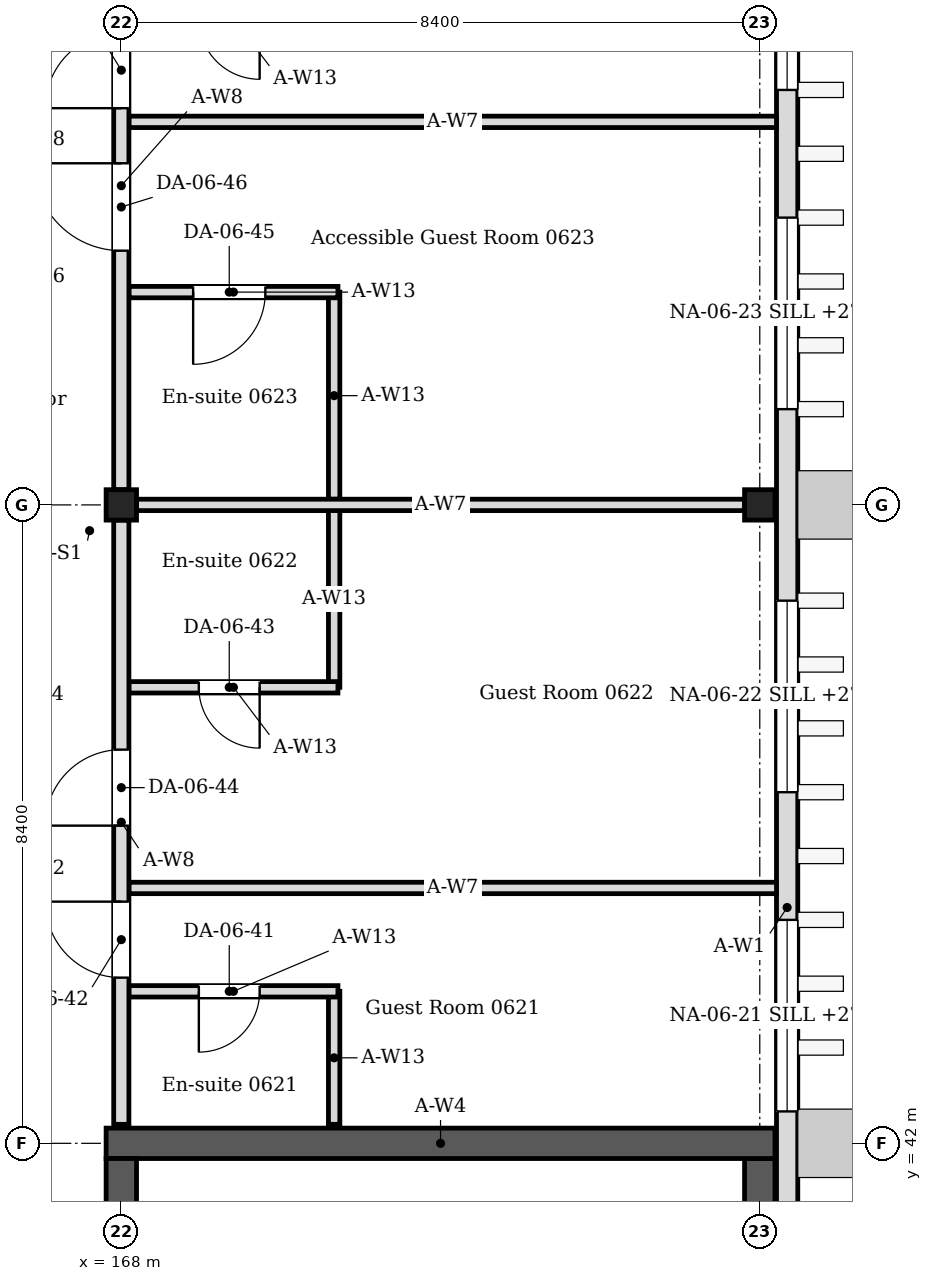
"""IFC4 building model, lengths in metres.
Left out: names, types, materials, properties, quantities, classifications, styles, units other than length and angle.
Written with IfcOpenShell. Run it as: python <this file> out.ifc"""

import sys

from ifc_helpers import new_model, si_unit, direction, frame, frame_2d, origin, origin_2d, place, context, subcontext, project, spatial, rectangle, i_section, extrude, element, fill, save


model = new_model("IFC4")
c1 = context("Model", 3, precision=1e-05, world=origin(), true_north=direction((0.0, 1.0)))
c2 = subcontext(c1, "Body", "Model", "MODEL_VIEW")
j1 = project(units=[si_unit("LENGTHUNIT", "METRE"), si_unit("PLANEANGLEUNIT", "RADIAN")], contexts=[c1])
p1 = place(None, origin())
s1 = spatial("IfcSite", under=j1, at=p1, CompositionType="ELEMENT")
p2 = place(p1, origin())
s2 = spatial("IfcBuilding", under=s1, at=p2, CompositionType="ELEMENT")
p3 = place(p2, frame((0.0, 0.0, 27.0)))
s3 = spatial("IfcBuildingStorey", under=s2, at=p3, CompositionType="ELEMENT", Elevation=27.0)
for number, where, z_axis, x_axis in (
    (1, (168.0, 50.4, 0.0), (0.0, 0.0, 1.0), (1.0, 0.0, 0.0)),
    (2, (176.4, 50.4, 0.0), (0.0, 0.0, 1.0), (1.0, 0.0, 0.0)),
):
    element("IfcColumn", number, at=place(p3, frame(where, z_axis=z_axis, x_axis=x_axis)), inside=s3, PredefinedType="COLUMN", context=c2, shape_type="SweptSolid", body=[
        extrude(i_section(OverallWidth=0.4, OverallDepth=0.4, WebThickness=0.013, FlangeThickness=0.021, FilletRadius=0.022, at=origin_2d()), origin(), (0.0, 0.0, 1.0), 4.2),
    ])
p4 = place(p3, frame((167.8, 42.0, 0.0), z_axis=(0.0, 0.0, 1.0), x_axis=(1.0, 0.0, 0.0)))
e3 = element("IfcWall", 3, at=p4, inside=s3, PredefinedType="SOLIDWALL", context=c2, shape_type="SweptSolid", body=[
    extrude(rectangle(XDim=8.8, YDim=0.4, at=frame_2d((4.4, 0.0))), origin(), (0.0, 0.0, 1.0), 4.05),
])
p5 = place(p3, frame((168.0, 25.4, 0.0), z_axis=(0.0, 0.0, 1.0), x_axis=(0.0, 1.0, 0.0)))
e4 = element("IfcWall", 4, at=p5, inside=s3, PredefinedType="SOLIDWALL", context=c2, shape_type="SweptSolid", body=[
    extrude(rectangle(XDim=16.4, YDim=0.4, at=frame_2d((8.2, 0.0))), origin(), (0.0, 0.0, 1.0), 4.05),
])
p6 = place(p5, frame((1.0, 0.0, 0.0)))
e5 = element("IfcOpeningElement", 5, at=p6, cuts=e4, PredefinedType="OPENING", context=c2, shape_type="SweptSolid", body=[
    extrude(rectangle(XDim=1.0, YDim=2.1, at=frame_2d((0.5, 1.05))), frame((0.0, 0.21, 0.0), z_axis=(0.0, -1.0, 0.0), x_axis=(1.0, 0.0, 0.0)), (0.0, 0.0, 1.0), 0.42),
])
p7 = place(p5, frame((14.4, 0.0, 0.0)))
e6 = element("IfcOpeningElement", 6, at=p7, cuts=e4, PredefinedType="OPENING", context=c2, shape_type="SweptSolid", body=[
    extrude(rectangle(XDim=1.4, YDim=2.1, at=frame_2d((0.7, 1.05))), frame((0.0, 0.21, 0.0), z_axis=(0.0, -1.0, 0.0), x_axis=(1.0, 0.0, 0.0)), (0.0, 0.0, 1.0), 0.42),
])
p8 = place(p3, frame((176.4, 25.4, 0.0), z_axis=(0.0, 0.0, 1.0), x_axis=(0.0, 1.0, 0.0)))
e7 = element("IfcWall", 7, at=p8, inside=s3, PredefinedType="SOLIDWALL", context=c2, shape_type="SweptSolid", body=[
    extrude(rectangle(XDim=16.4, YDim=0.4, at=frame_2d((8.2, 0.0))), origin(), (0.0, 0.0, 1.0), 4.05),
])
p9 = place(p3, frame((176.76, 24.85, 0.0), z_axis=(0.0, 0.0, 1.0), x_axis=(0.0, 1.0, 0.0)))
e8 = element("IfcWall", 8, at=p9, inside=s3, PredefinedType="SOLIDWALL", context=c2, shape_type="SweptSolid", body=[
    extrude(rectangle(XDim=42.57, YDim=0.28, at=frame_2d((21.285, 0.0))), origin(), (0.0, 0.0, 1.0), 4.05),
])
p10 = place(p9, frame((17.57, 0.0, 0.6)))
e9 = element("IfcOpeningElement", 9, at=p10, cuts=e8, PredefinedType="OPENING", context=c2, shape_type="SweptSolid", body=[
    extrude(rectangle(XDim=2.52, YDim=2.4, at=frame_2d((1.26, 1.2))), frame((0.0, 0.15, 0.0), z_axis=(0.0, -1.0, 0.0), x_axis=(1.0, 0.0, 0.0)), (0.0, 0.0, 1.0), 0.3),
])
p11 = place(p9, frame((21.77, 0.0, 0.6)))
e10 = element("IfcOpeningElement", 10, at=p11, cuts=e8, PredefinedType="OPENING", context=c2, shape_type="SweptSolid", body=[
    extrude(rectangle(XDim=2.52, YDim=2.4, at=frame_2d((1.26, 1.2))), frame((0.0, 0.15, 0.0), z_axis=(0.0, -1.0, 0.0), x_axis=(1.0, 0.0, 0.0)), (0.0, 0.0, 1.0), 0.3),
])
p12 = place(p9, frame((26.81, 0.0, 0.45)))
e11 = element("IfcOpeningElement", 11, at=p12, cuts=e8, PredefinedType="OPENING", context=c2, shape_type="SweptSolid", body=[
    extrude(rectangle(XDim=2.52, YDim=2.1, at=frame_2d((1.26, 1.05))), frame((0.0, 0.15, 0.0), z_axis=(0.0, -1.0, 0.0), x_axis=(1.0, 0.0, 0.0)), (0.0, 0.0, 1.0), 0.3),
])
p13 = place(p9, frame((31.01, 0.0, 0.6)))
e12 = element("IfcOpeningElement", 12, at=p13, cuts=e8, PredefinedType="OPENING", context=c2, shape_type="SweptSolid", body=[
    extrude(rectangle(XDim=2.52, YDim=2.4, at=frame_2d((1.26, 1.2))), frame((0.0, 0.15, 0.0), z_axis=(0.0, -1.0, 0.0), x_axis=(1.0, 0.0, 0.0)), (0.0, 0.0, 1.0), 0.3),
])
p14 = place(p3, frame((170.8, 42.25, 0.0), z_axis=(0.0, 0.0, 1.0), x_axis=(0.0, 1.0, 0.0)))
e13 = element("IfcWall", 13, at=p14, inside=s3, PredefinedType="PARTITIONING", context=c2, shape_type="SweptSolid", body=[
    extrude(rectangle(XDim=1.75, YDim=0.15, at=frame_2d((0.875, 0.0))), origin(), (0.0, 0.0, 1.0), 4.05),
])
p15 = place(p3, frame((170.85, 44.0, 0.0), z_axis=(0.0, 0.0, 1.0), x_axis=(-1.0, 0.0, 0.0)))
e14 = element("IfcWall", 14, at=p15, inside=s3, PredefinedType="PARTITIONING", context=c2, shape_type="SweptSolid", body=[
    extrude(rectangle(XDim=2.75, YDim=0.15, at=frame_2d((1.375, 0.0))), origin(), (0.0, 0.0, 1.0), 4.05),
])
p16 = place(p15, frame((1.03, 0.0, 0.0)))
e15 = element("IfcOpeningElement", 15, at=p16, cuts=e14, PredefinedType="OPENING", context=c2, shape_type="SweptSolid", body=[
    extrude(rectangle(XDim=0.8, YDim=2.1, at=frame_2d((0.4, 1.05))), frame((0.0, 0.085, 0.0), z_axis=(0.0, -1.0, 0.0), x_axis=(1.0, 0.0, 0.0)), (0.0, 0.0, 1.0), 0.17),
])
p17 = place(p3, frame((170.8, 48.0, 0.0), z_axis=(0.0, 0.0, 1.0), x_axis=(0.0, 1.0, 0.0)))
e16 = element("IfcWall", 16, at=p17, inside=s3, PredefinedType="PARTITIONING", context=c2, shape_type="SweptSolid", body=[
    extrude(rectangle(XDim=2.325, YDim=0.15, at=frame_2d((1.163, 0.0))), origin(), (0.0, 0.0, 1.0), 4.05),
])
p18 = place(p3, frame((170.85, 48.0, 0.0), z_axis=(0.0, 0.0, 1.0), x_axis=(-1.0, 0.0, 0.0)))
e17 = element("IfcWall", 17, at=p18, inside=s3, PredefinedType="PARTITIONING", context=c2, shape_type="SweptSolid", body=[
    extrude(rectangle(XDim=2.75, YDim=0.15, at=frame_2d((1.375, 0.0))), origin(), (0.0, 0.0, 1.0), 4.05),
])
p19 = place(p18, frame((1.03, 0.0, 0.0)))
e18 = element("IfcOpeningElement", 18, at=p19, cuts=e17, PredefinedType="OPENING", context=c2, shape_type="SweptSolid", body=[
    extrude(rectangle(XDim=0.8, YDim=2.1, at=frame_2d((0.4, 1.05))), frame((0.0, 0.085, 0.0), z_axis=(0.0, -1.0, 0.0), x_axis=(1.0, 0.0, 0.0)), (0.0, 0.0, 1.0), 0.17),
])
p20 = place(p3, frame((170.8, 50.475, 0.0), z_axis=(0.0, 0.0, 1.0), x_axis=(0.0, 1.0, 0.0)))
e19 = element("IfcWall", 19, at=p20, inside=s3, PredefinedType="PARTITIONING", context=c2, shape_type="SweptSolid", body=[
    extrude(rectangle(XDim=2.725, YDim=0.15, at=frame_2d((1.362, 0.0))), origin(), (0.0, 0.0, 1.0), 4.05),
])
p21 = place(p3, frame((170.85, 53.2, 0.0), z_axis=(0.0, 0.0, 1.0), x_axis=(-1.0, 0.0, 0.0)))
e20 = element("IfcWall", 20, at=p21, inside=s3, PredefinedType="PARTITIONING", context=c2, shape_type="SweptSolid", body=[
    extrude(rectangle(XDim=2.75, YDim=0.15, at=frame_2d((1.375, 0.0))), origin(), (0.0, 0.0, 1.0), 4.05),
])
p22 = place(p21, frame((0.955, 0.0, 0.0)))
e21 = element("IfcOpeningElement", 21, at=p22, cuts=e20, PredefinedType="OPENING", context=c2, shape_type="SweptSolid", body=[
    extrude(rectangle(XDim=0.95, YDim=2.1, at=frame_2d((0.475, 1.05))), frame((0.0, 0.085, 0.0), z_axis=(0.0, -1.0, 0.0), x_axis=(1.0, 0.0, 0.0)), (0.0, 0.0, 1.0), 0.17),
])
p23 = place(p3, frame((168.2, 50.4, 0.0), z_axis=(0.0, 0.0, 1.0), x_axis=(1.0, 0.0, 0.0)))
e22 = element("IfcWall", 22, at=p23, inside=s3, PredefinedType="PARTITIONING", context=c2, shape_type="SweptSolid", body=[
    extrude(rectangle(XDim=8.0, YDim=0.15, at=frame_2d((4.0, 0.0))), origin(), (0.0, 0.0, 1.0), 3.604),
])
for number, where, z_axis, x_axis in (
    (23, (168.1, 45.36, 0.0), (0.0, 0.0, 1.0), (1.0, 0.0, 0.0)),
    (24, (168.1, 55.44, 0.0), (0.0, 0.0, 1.0), (1.0, 0.0, 0.0)),
):
    element("IfcWall", number, at=place(p3, frame(where, z_axis=z_axis, x_axis=x_axis)), inside=s3, PredefinedType="PARTITIONING", context=c2, shape_type="SweptSolid", body=[
        extrude(rectangle(XDim=8.52, YDim=0.15, at=frame_2d((4.26, 0.0))), origin(), (0.0, 0.0, 1.0), 3.604),
    ])
p24 = place(p3, frame((168.0, 42.25, 0.0), z_axis=(0.0, 0.0, 1.0), x_axis=(0.0, 1.0, 0.0)))
e25 = element("IfcWall", 25, at=p24, inside=s3, PredefinedType="PARTITIONING", context=c2, shape_type="SweptSolid", body=[
    extrude(rectangle(XDim=7.95, YDim=0.2, at=frame_2d((3.975, 0.0))), origin(), (0.0, 0.0, 1.0), 3.45),
])
p25 = place(p24, frame((1.93, 0.0, 0.0)))
e26 = element("IfcOpeningElement", 26, at=p25, cuts=e25, PredefinedType="OPENING", context=c2, shape_type="SweptSolid", body=[
    extrude(rectangle(XDim=1.0, YDim=2.4, at=frame_2d((0.5, 1.2))), frame((0.0, 0.11, 0.0), z_axis=(0.0, -1.0, 0.0), x_axis=(1.0, 0.0, 0.0)), (0.0, 0.0, 1.0), 0.22),
])
p26 = place(p24, frame((3.93, 0.0, 0.0)))
e27 = element("IfcOpeningElement", 27, at=p26, cuts=e25, PredefinedType="OPENING", context=c2, shape_type="SweptSolid", body=[
    extrude(rectangle(XDim=1.0, YDim=2.4, at=frame_2d((0.5, 1.2))), frame((0.0, 0.11, 0.0), z_axis=(0.0, -1.0, 0.0), x_axis=(1.0, 0.0, 0.0)), (0.0, 0.0, 1.0), 0.22),
])
p27 = place(p3, frame((168.0, 50.6, 0.0), z_axis=(0.0, 0.0, 1.0), x_axis=(0.0, 1.0, 0.0)))
e28 = element("IfcWall", 28, at=p27, inside=s3, PredefinedType="PARTITIONING", context=c2, shape_type="SweptSolid", body=[
    extrude(rectangle(XDim=8.0, YDim=0.2, at=frame_2d((4.0, 0.0))), origin(), (0.0, 0.0, 1.0), 3.45),
])
p28 = place(p27, frame((3.145, 0.0, 0.0)))
e29 = element("IfcOpeningElement", 29, at=p28, cuts=e28, PredefinedType="OPENING", context=c2, shape_type="SweptSolid", body=[
    extrude(rectangle(XDim=1.15, YDim=2.1, at=frame_2d((0.575, 1.05))), frame((0.0, 0.11, 0.0), z_axis=(0.0, -1.0, 0.0), x_axis=(1.0, 0.0, 0.0)), (0.0, 0.0, 1.0), 0.22),
])
p29 = place(p27, frame((5.02, 0.0, 0.0)))
e30 = element("IfcOpeningElement", 30, at=p29, cuts=e28, PredefinedType="OPENING", context=c2, shape_type="SweptSolid", body=[
    extrude(rectangle(XDim=1.0, YDim=2.4, at=frame_2d((0.5, 1.2))), frame((0.0, 0.11, 0.0), z_axis=(0.0, -1.0, 0.0), x_axis=(1.0, 0.0, 0.0)), (0.0, 0.0, 1.0), 0.22),
])
p30 = place(p10, origin())
e31 = element("IfcWindow", 31, at=p30, inside=s3, PartitioningType="SINGLE_PANEL", PredefinedType="WINDOW", context=c2, shape_type="SweptSolid", body=[
    extrude(rectangle(XDim=2.52, YDim=2.4, at=frame_2d((1.26, 1.2))), frame((0.0, 0.03, 0.0), z_axis=(0.0, -1.0, 0.0), x_axis=(1.0, 0.0, 0.0)), (0.0, 0.0, 1.0), 0.06),
])
fill(e9, e31)
p31 = place(p11, origin())
e32 = element("IfcWindow", 32, at=p31, inside=s3, PartitioningType="SINGLE_PANEL", PredefinedType="WINDOW", context=c2, shape_type="SweptSolid", body=[
    extrude(rectangle(XDim=2.52, YDim=2.4, at=frame_2d((1.26, 1.2))), frame((0.0, 0.03, 0.0), z_axis=(0.0, -1.0, 0.0), x_axis=(1.0, 0.0, 0.0)), (0.0, 0.0, 1.0), 0.06),
])
fill(e10, e32)
p32 = place(p12, origin())
e33 = element("IfcWindow", 33, at=p32, inside=s3, PartitioningType="SINGLE_PANEL", PredefinedType="WINDOW", context=c2, shape_type="SweptSolid", body=[
    extrude(rectangle(XDim=2.52, YDim=2.1, at=frame_2d((1.26, 1.05))), frame((0.0, 0.03, 0.0), z_axis=(0.0, -1.0, 0.0), x_axis=(1.0, 0.0, 0.0)), (0.0, 0.0, 1.0), 0.06),
])
fill(e11, e33)
p33 = place(p13, origin())
e34 = element("IfcWindow", 34, at=p33, inside=s3, PartitioningType="SINGLE_PANEL", PredefinedType="WINDOW", context=c2, shape_type="SweptSolid", body=[
    extrude(rectangle(XDim=2.52, YDim=2.4, at=frame_2d((1.26, 1.2))), frame((0.0, 0.03, 0.0), z_axis=(0.0, -1.0, 0.0), x_axis=(1.0, 0.0, 0.0)), (0.0, 0.0, 1.0), 0.06),
])
fill(e12, e34)
p34 = place(p16, origin())
e35 = element("IfcDoor", 35, at=p34, inside=s3, OperationType="SINGLE_SWING_RIGHT", PredefinedType="DOOR", context=c2, shape_type="SweptSolid", body=[
    extrude(rectangle(XDim=0.8, YDim=2.1, at=frame_2d((0.4, 1.05))), frame((0.0, 0.025, 0.0), z_axis=(0.0, -1.0, 0.0), x_axis=(1.0, 0.0, 0.0)), (0.0, 0.0, 1.0), 0.05),
])
fill(e15, e35)
p35 = place(p25, origin())
e36 = element("IfcDoor", 36, at=p35, inside=s3, OperationType="SINGLE_SWING_RIGHT", PredefinedType="DOOR", context=c2, shape_type="SweptSolid", body=[
    extrude(rectangle(XDim=1.0, YDim=2.4, at=frame_2d((0.5, 1.2))), frame((0.0, 0.025, 0.0), z_axis=(0.0, -1.0, 0.0), x_axis=(1.0, 0.0, 0.0)), (0.0, 0.0, 1.0), 0.05),
])
fill(e26, e36)
p36 = place(p19, origin())
e37 = element("IfcDoor", 37, at=p36, inside=s3, OperationType="SINGLE_SWING_LEFT", PredefinedType="DOOR", context=c2, shape_type="SweptSolid", body=[
    extrude(rectangle(XDim=0.8, YDim=2.1, at=frame_2d((0.4, 1.05))), frame((0.0, 0.025, 0.0), z_axis=(0.0, -1.0, 0.0), x_axis=(1.0, 0.0, 0.0)), (0.0, 0.0, 1.0), 0.05),
])
fill(e18, e37)
p37 = place(p26, origin())
e38 = element("IfcDoor", 38, at=p37, inside=s3, OperationType="SINGLE_SWING_LEFT", PredefinedType="DOOR", context=c2, shape_type="SweptSolid", body=[
    extrude(rectangle(XDim=1.0, YDim=2.4, at=frame_2d((0.5, 1.2))), frame((0.0, 0.025, 0.0), z_axis=(0.0, -1.0, 0.0), x_axis=(1.0, 0.0, 0.0)), (0.0, 0.0, 1.0), 0.05),
])
fill(e27, e38)
p38 = place(p22, origin())
e39 = element("IfcDoor", 39, at=p38, inside=s3, OperationType="SINGLE_SWING_RIGHT", PredefinedType="DOOR", context=c2, shape_type="SweptSolid", body=[
    extrude(rectangle(XDim=0.95, YDim=2.1, at=frame_2d((0.475, 1.05))), frame((0.0, 0.025, 0.0), z_axis=(0.0, -1.0, 0.0), x_axis=(1.0, 0.0, 0.0)), (0.0, 0.0, 1.0), 0.05),
])
fill(e21, e39)
p39 = place(p28, origin())
e40 = element("IfcDoor", 40, at=p39, inside=s3, OperationType="SINGLE_SWING_RIGHT", PredefinedType="DOOR", context=c2, shape_type="SweptSolid", body=[
    extrude(rectangle(XDim=1.15, YDim=2.1, at=frame_2d((0.575, 1.05))), frame((0.0, 0.025, 0.0), z_axis=(0.0, -1.0, 0.0), x_axis=(1.0, 0.0, 0.0)), (0.0, 0.0, 1.0), 0.05),
])
fill(e29, e40)
p40 = place(p29, origin())
e41 = element("IfcDoor", 41, at=p40, inside=s3, OperationType="SINGLE_SWING_LEFT", PredefinedType="DOOR", context=c2, shape_type="SweptSolid", body=[
    extrude(rectangle(XDim=1.0, YDim=2.4, at=frame_2d((0.5, 1.2))), frame((0.0, 0.025, 0.0), z_axis=(0.0, -1.0, 0.0), x_axis=(1.0, 0.0, 0.0)), (0.0, 0.0, 1.0), 0.05),
])
fill(e30, e41)
save(model, sys.argv[1])
